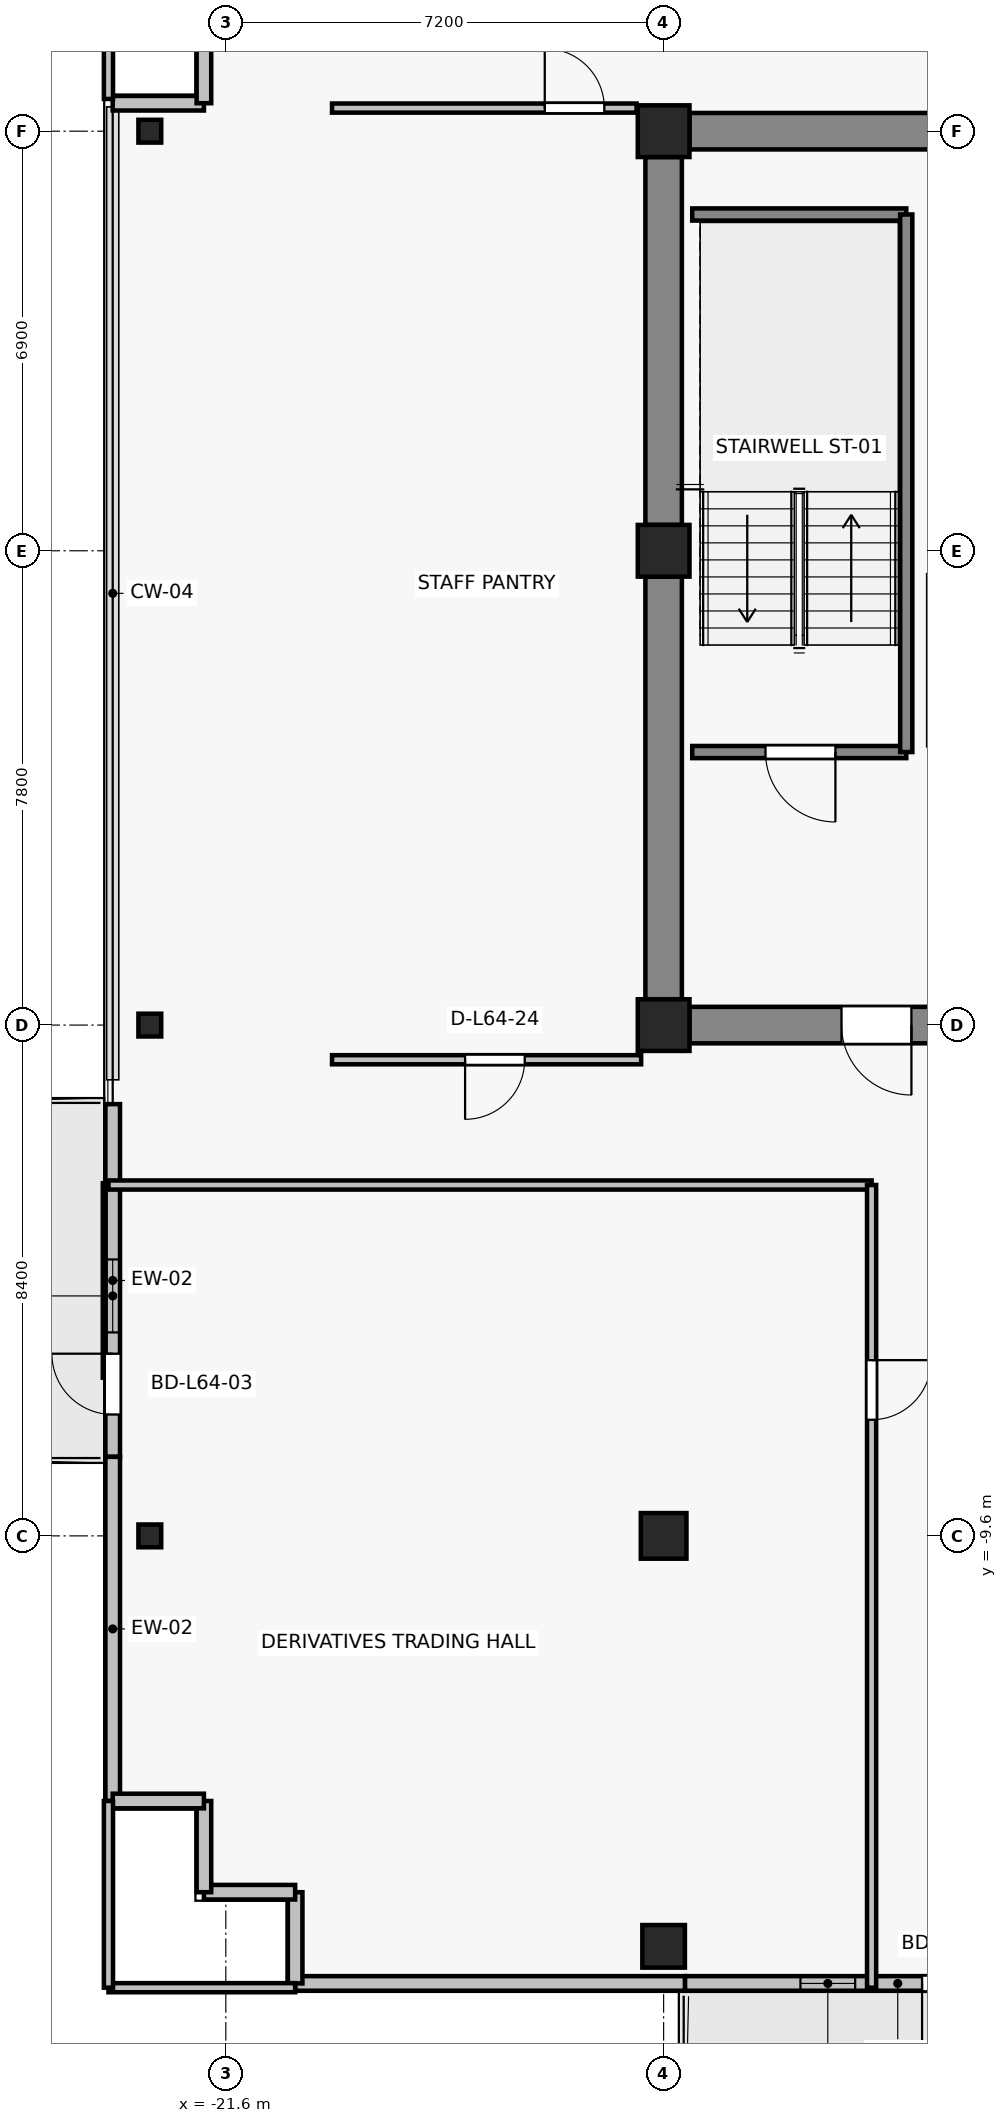
"""IFC4 building model, lengths in metres.
Left out: names, types, materials, properties, quantities, classifications, styles, units other than length and angle.
Written with IfcOpenShell. Run it as: python <this file> out.ifc"""

import sys

from ifc_helpers import new_model, si_unit, direction, frame, frame_2d, origin, origin_2d, place, context, subcontext, project, spatial, rectangle, i_section, extrude, source, transform, mapped, element, fill, save


model = new_model("IFC4")
c1 = context("Model", 3, precision=1e-05, world=origin(), true_north=direction((0.0, 1.0)))
c2 = subcontext(c1, "Body", "Model", "MODEL_VIEW")
j1 = project(units=[si_unit("LENGTHUNIT", "METRE"), si_unit("PLANEANGLEUNIT", "RADIAN")], contexts=[c1])
p1 = place(None, origin())
s1 = spatial("IfcSite", under=j1, at=p1, CompositionType="ELEMENT")
p2 = place(p1, origin())
s2 = spatial("IfcBuilding", under=s1, at=p2, CompositionType="ELEMENT")
p3 = place(p2, frame((0.0, 0.0, 228.7)))
s3 = spatial("IfcBuildingStorey", under=s2, at=p3, CompositionType="ELEMENT", Elevation=228.7)
for number, where, z_axis, x_axis in (
    (1, (-14.4, -1.2, 0.0), (0.0, 0.0, 1.0), (1.0, 0.0, 0.0)),
    (2, (-14.4, 6.6, 0.0), (0.0, 0.0, 1.0), (1.0, 0.0, 0.0)),
    (3, (-14.4, 13.5, 0.0), (0.0, 0.0, 1.0), (1.0, 0.0, 0.0)),
):
    element("IfcColumn", number, at=place(p3, frame(where, z_axis=z_axis, x_axis=x_axis)), inside=s3, PredefinedType="COLUMN", context=c2, shape_type="SweptSolid", body=[
        extrude(rectangle(XDim=0.85, YDim=0.85, at=origin_2d()), origin(), (0.0, 0.0, 1.0), 3.3),
    ])
p4 = place(p3, frame((-14.4, -9.6, 0.0), z_axis=(0.0, 0.0, 1.0), x_axis=(1.0, 0.0, 0.0)))
e4 = element("IfcColumn", 4, at=p4, inside=s3, PredefinedType="COLUMN", context=c2, shape_type="SweptSolid", body=[
    extrude(rectangle(XDim=0.75, YDim=0.75, at=origin_2d()), origin(), (0.0, 0.0, 1.0), 3.3),
])
p5 = place(p3, frame((-14.4, -16.35, 0.0), z_axis=(0.0, 0.0, 1.0), x_axis=(1.0, 0.0, 0.0)))
e5 = element("IfcColumn", 5, at=p5, inside=s3, PredefinedType="COLUMN", context=c2, shape_type="SweptSolid", body=[
    extrude(rectangle(XDim=0.7, YDim=0.7, at=origin_2d()), origin(), (0.0, 0.0, 1.0), 3.3),
])
for number, where, z_axis, x_axis in (
    (6, (-22.85, -9.6, 0.0), (0.0, 0.0, 1.0), (1.0, 0.0, 0.0)),
    (7, (-22.85, -1.2, 0.0), (0.0, 0.0, 1.0), (1.0, 0.0, 0.0)),
    (8, (-22.85, 13.5, 0.0), (0.0, 0.0, 1.0), (1.0, 0.0, 0.0)),
):
    element("IfcColumn", number, at=place(p3, frame(where, z_axis=z_axis, x_axis=x_axis)), inside=s3, PredefinedType="COLUMN", context=c2, shape_type="SweptSolid", body=[
        extrude(i_section(OverallWidth=0.375, OverallDepth=0.375, WebThickness=0.017, FlangeThickness=0.027, FilletRadius=0.015, at=origin_2d()), origin(), (0.0, 0.0, 1.0), 3.3),
    ])
p6 = place(p3, frame((-13.975, 13.5, 0.0), z_axis=(0.0, 0.0, 1.0), x_axis=(1.0, 0.0, 0.0)))
e9 = element("IfcWall", 9, at=p6, inside=s3, PredefinedType="SHEAR", context=c2, shape_type="SweptSolid", body=[
    extrude(rectangle(XDim=6.35, YDim=0.6, at=frame_2d((3.175, 0.0))), origin(), (0.0, 0.0, 1.0), 3.075),
])
p7 = place(p3, frame((-14.4, -0.775, 0.0), z_axis=(0.0, 0.0, 1.0), x_axis=(0.0, 1.0, 0.0)))
e10 = element("IfcWall", 10, at=p7, inside=s3, PredefinedType="SHEAR", context=c2, shape_type="SweptSolid", body=[
    extrude(rectangle(XDim=6.95, YDim=0.6, at=frame_2d((3.475, 0.0))), origin(), (0.0, 0.0, 1.0), 3.075),
])
p8 = place(p3, frame((-14.4, 7.025, 0.0), z_axis=(0.0, 0.0, 1.0), x_axis=(0.0, 1.0, 0.0)))
e11 = element("IfcWall", 11, at=p8, inside=s3, PredefinedType="SHEAR", context=c2, shape_type="SweptSolid", body=[
    extrude(rectangle(XDim=6.05, YDim=0.6, at=frame_2d((3.025, 0.0))), origin(), (0.0, 0.0, 1.0), 3.075),
])
p9 = place(p3, frame((-7.625, -1.2, 0.0), z_axis=(0.0, 0.0, 1.0), x_axis=(-1.0, 0.0, 0.0)))
e12 = element("IfcWall", 12, at=p9, inside=s3, PredefinedType="SHEAR", context=c2, shape_type="SweptSolid", body=[
    extrude(rectangle(XDim=6.35, YDim=0.6, at=frame_2d((3.175, 0.0))), origin(), (0.0, 0.0, 1.0), 3.075),
])
p10 = place(p9, frame((2.7, 0.0, 0.0)))
e13 = element("IfcOpeningElement", 13, at=p10, cuts=e12, PredefinedType="OPENING", context=c2, shape_type="SweptSolid", body=[
    extrude(rectangle(XDim=1.15, YDim=2.15, at=frame_2d((0.575, 1.075))), frame((0.0, 0.31, 0.0), z_axis=(0.0, -1.0, 0.0), x_axis=(1.0, 0.0, 0.0)), (0.0, 0.0, 1.0), 0.62),
])
p11 = place(p3, frame((-7.05, -16.96, 0.0), z_axis=(0.0, 0.0, 1.0), x_axis=(-1.0, 0.0, 0.0)))
e14 = element("IfcWall", 14, at=p11, inside=s3, PredefinedType="SOLIDWALL", context=c2, shape_type="SweptSolid", body=[
    extrude(rectangle(XDim=7.0, YDim=0.24, at=frame_2d((3.5, 0.0))), origin(), (0.0, 0.0, 1.0), 2.665),
])
p12 = place(p11, frame((2.1, 0.0, 0.0)))
e15 = element("IfcOpeningElement", 15, at=p12, cuts=e14, PredefinedType="OPENING", context=c2, shape_type="SweptSolid", body=[
    extrude(rectangle(XDim=1.0, YDim=2.2, at=frame_2d((0.5, 1.1))), frame((0.0, 0.13, 0.0), z_axis=(0.0, -1.0, 0.0), x_axis=(1.0, 0.0, 0.0)), (0.0, 0.0, 1.0), 0.26),
])
p13 = place(p11, frame((4.2, 0.0, 0.85)))
e16 = element("IfcOpeningElement", 16, at=p13, cuts=e14, PredefinedType="OPENING", context=c2, shape_type="SweptSolid", body=[
    extrude(rectangle(XDim=0.9, YDim=1.35, at=frame_2d((0.45, 0.675))), frame((0.0, 0.13, 0.0), z_axis=(0.0, -1.0, 0.0), x_axis=(1.0, 0.0, 0.0)), (0.0, 0.0, 1.0), 0.26),
])
p14 = place(p3, frame((-23.46, -8.3, 0.0), z_axis=(0.0, 0.0, 1.0), x_axis=(0.0, 1.0, 0.0)))
e17 = element("IfcWall", 17, at=p14, inside=s3, PredefinedType="SOLIDWALL", context=c2, shape_type="SweptSolid", body=[
    extrude(rectangle(XDim=5.8, YDim=0.24, at=frame_2d((2.9, 0.0))), origin(), (0.0, 0.0, 1.0), 3.075),
])
p15 = place(p14, frame((0.696, 0.0, 0.0)))
e18 = element("IfcOpeningElement", 18, at=p15, cuts=e17, PredefinedType="OPENING", context=c2, shape_type="SweptSolid", body=[
    extrude(rectangle(XDim=1.0, YDim=2.2, at=frame_2d((0.5, 1.1))), frame((0.0, 0.13, 0.0), z_axis=(0.0, -1.0, 0.0), x_axis=(1.0, 0.0, 0.0)), (0.0, 0.0, 1.0), 0.26),
])
p16 = place(p14, frame((2.046, 0.0, 0.85)))
e19 = element("IfcOpeningElement", 19, at=p16, cuts=e17, PredefinedType="OPENING", context=c2, shape_type="SweptSolid", body=[
    extrude(rectangle(XDim=1.2, YDim=1.5, at=frame_2d((0.6, 0.75))), frame((0.0, 0.13, 0.0), z_axis=(0.0, -1.0, 0.0), x_axis=(1.0, 0.0, 0.0)), (0.0, 0.0, 1.0), 0.26),
])
p17 = place(p3, frame((-23.46, -8.3, 0.0), z_axis=(0.0, 0.0, 1.0), x_axis=(0.0, -1.0, 0.0)))
e20 = element("IfcWall", 20, at=p17, inside=s3, PredefinedType="SOLIDWALL", context=c2, shape_type="SweptSolid", body=[
    extrude(rectangle(XDim=5.66, YDim=0.24, at=frame_2d((2.83, 0.0))), origin(), (0.0, 0.0, 1.0), 3.075),
])
for number, where, z_axis, x_axis in (
    (21, (-21.96, 13.96, 0.0), (0.0, 0.0, 1.0), (-1.0, 0.0, 0.0)),
    (22, (-21.96, 15.46, 0.0), (0.0, 0.0, 1.0), (0.0, -1.0, 0.0)),
):
    element("IfcWall", number, at=place(p3, frame(where, z_axis=z_axis, x_axis=x_axis)), inside=s3, PredefinedType="SOLIDWALL", context=c2, shape_type="SweptSolid", body=[
        extrude(rectangle(XDim=1.5, YDim=0.24, at=frame_2d((0.75, 0.0))), origin(), (0.0, 0.0, 1.0), 3.075),
    ])
p18 = place(p3, frame((-20.46, -16.96, 0.0), z_axis=(0.0, 0.0, 1.0), x_axis=(1.0, 0.0, 0.0)))
e23 = element("IfcWall", 23, at=p18, inside=s3, PredefinedType="SOLIDWALL", context=c2, shape_type="SweptSolid", body=[
    extrude(rectangle(XDim=6.41, YDim=0.24, at=frame_2d((3.205, 0.0))), origin(), (0.0, 0.0, 1.0), 3.075),
])
for number, where, z_axis, x_axis in (
    (24, (-20.46, -15.46, 0.0), (0.0, 0.0, 1.0), (0.0, -1.0, 0.0)),
    (25, (-21.96, -15.46, 0.0), (0.0, 0.0, 1.0), (1.0, 0.0, 0.0)),
    (26, (-21.96, -13.96, 0.0), (0.0, 0.0, 1.0), (0.0, -1.0, 0.0)),
    (27, (-23.46, -13.96, 0.0), (0.0, 0.0, 1.0), (1.0, 0.0, 0.0)),
):
    element("IfcWall", number, at=place(p3, frame(where, z_axis=z_axis, x_axis=x_axis)), inside=s3, PredefinedType="SOLIDWALL", context=c2, shape_type="SweptSolid", body=[
        extrude(rectangle(XDim=1.5, YDim=0.24, at=frame_2d((0.75, 0.0))), origin(), (0.0, 0.0, 1.0), 3.075),
    ])
p19 = place(p3, frame((-10.41, 3.29, 0.0), z_axis=(0.0, 0.0, 1.0), x_axis=(-1.0, 0.0, 0.0)))
e28 = element("IfcWall", 28, at=p19, inside=s3, PredefinedType="SOLIDWALL", context=c2, shape_type="SweptSolid", body=[
    extrude(rectangle(XDim=3.52, YDim=0.2, at=frame_2d((1.76, 0.0))), origin(), (0.0, 0.0, 1.0), 3.075),
])
p20 = place(p19, frame((1.165, 0.0, 0.0)))
e29 = element("IfcOpeningElement", 29, at=p20, cuts=e28, PredefinedType="OPENING", context=c2, shape_type="SweptSolid", body=[
    extrude(rectangle(XDim=1.15, YDim=2.15, at=frame_2d((0.575, 1.075))), frame((0.0, 0.11, 0.0), z_axis=(0.0, -1.0, 0.0), x_axis=(1.0, 0.0, 0.0)), (0.0, 0.0, 1.0), 0.22),
])
p21 = place(p3, frame((-13.93, 12.13, 0.0), z_axis=(0.0, 0.0, 1.0), x_axis=(1.0, 0.0, 0.0)))
e30 = element("IfcWall", 30, at=p21, inside=s3, PredefinedType="SOLIDWALL", context=c2, shape_type="SweptSolid", body=[
    extrude(rectangle(XDim=3.52, YDim=0.2, at=frame_2d((1.76, 0.0))), origin(), (0.0, 0.0, 1.0), 3.075),
])
p22 = place(p3, frame((-10.41, 12.13, 0.0), z_axis=(0.0, 0.0, 1.0), x_axis=(0.0, -1.0, 0.0)))
e31 = element("IfcWall", 31, at=p22, inside=s3, PredefinedType="SOLIDWALL", context=c2, shape_type="SweptSolid", body=[
    extrude(rectangle(XDim=8.84, YDim=0.2, at=frame_2d((4.42, 0.0))), origin(), (0.0, 0.0, 1.0), 3.075),
])
p23 = place(p3, frame((-20.46, -17.03, 0.0), z_axis=(0.0, 0.0, 1.0), x_axis=(-1.0, 0.0, 0.0)))
e32 = element("IfcWall", 32, at=p23, inside=s3, PredefinedType="PARTITIONING", context=c2, shape_type="SweptSolid", body=[
    extrude(rectangle(XDim=3.07, YDim=0.15, at=frame_2d((1.535, 0.0))), origin(), (0.0, 0.0, 1.0), 2.665),
])
p24 = place(p3, frame((-23.53, -3.83, 0.0), z_axis=(0.0, 0.0, 1.0), x_axis=(1.0, 0.0, 0.0)))
e33 = element("IfcWall", 33, at=p24, inside=s3, PredefinedType="PARTITIONING", context=c2, shape_type="SweptSolid", body=[
    extrude(rectangle(XDim=12.55, YDim=0.15, at=frame_2d((6.275, 0.0))), origin(), (0.0, 0.0, 1.0), 2.615),
])
p25 = place(p3, frame((-23.53, -17.03, 0.0), z_axis=(0.0, 0.0, 1.0), x_axis=(0.0, 1.0, 0.0)))
e34 = element("IfcWall", 34, at=p25, inside=s3, PredefinedType="PARTITIONING", context=c2, shape_type="SweptSolid", body=[
    extrude(rectangle(XDim=3.07, YDim=0.15, at=frame_2d((1.535, 0.0))), origin(), (0.0, 0.0, 1.0), 3.075),
])
p26 = place(p3, frame((-10.98, -3.83, 0.0), z_axis=(0.0, 0.0, 1.0), x_axis=(0.0, -1.0, 0.0)))
e35 = element("IfcWall", 35, at=p26, inside=s3, PredefinedType="PARTITIONING", context=c2, shape_type="SweptSolid", body=[
    extrude(rectangle(XDim=13.2, YDim=0.15, at=frame_2d((6.6, 0.0))), origin(), (0.0, 0.0, 1.0), 2.615),
])
p27 = place(p26, frame((2.88, 0.0, 0.0)))
e36 = element("IfcOpeningElement", 36, at=p27, cuts=e35, PredefinedType="OPENING", context=c2, shape_type="SweptSolid", body=[
    extrude(rectangle(XDim=0.98, YDim=2.15, at=frame_2d((0.49, 1.075))), frame((0.0, 0.085, 0.0), z_axis=(0.0, -1.0, 0.0), x_axis=(1.0, 0.0, 0.0)), (0.0, 0.0, 1.0), 0.17),
])
p28 = place(p3, frame((-14.77, -1.77, 0.0), z_axis=(0.0, 0.0, 1.0), x_axis=(-1.0, 0.0, 0.0)))
e37 = element("IfcWall", 37, at=p28, inside=s3, PredefinedType="PARTITIONING", context=c2, shape_type="SweptSolid", body=[
    extrude(rectangle(XDim=5.083, YDim=0.15, at=frame_2d((2.542, 0.0))), origin(), (0.0, 0.0, 1.0), 2.765),
])
p29 = place(p28, frame((1.915, 0.0, 0.0)))
e38 = element("IfcOpeningElement", 38, at=p29, cuts=e37, PredefinedType="OPENING", context=c2, shape_type="SweptSolid", body=[
    extrude(rectangle(XDim=0.98, YDim=2.15, at=frame_2d((0.49, 1.075))), frame((0.0, 0.085, 0.0), z_axis=(0.0, -1.0, 0.0), x_axis=(1.0, 0.0, 0.0)), (0.0, 0.0, 1.0), 0.17),
])
p30 = place(p3, frame((-19.853, 13.88, 0.0), z_axis=(0.0, 0.0, 1.0), x_axis=(1.0, 0.0, 0.0)))
e39 = element("IfcWall", 39, at=p30, inside=s3, PredefinedType="PARTITIONING", context=c2, shape_type="SweptSolid", body=[
    extrude(rectangle(XDim=5.008, YDim=0.15, at=frame_2d((2.504, 0.0))), origin(), (0.0, 0.0, 1.0), 3.075),
])
p31 = place(p30, frame((3.498, 0.0, 0.0)))
e40 = element("IfcOpeningElement", 40, at=p31, cuts=e39, PredefinedType="OPENING", context=c2, shape_type="SweptSolid", body=[
    extrude(rectangle(XDim=0.98, YDim=2.15, at=frame_2d((0.49, 1.075))), frame((0.0, 0.085, 0.0), z_axis=(0.0, -1.0, 0.0), x_axis=(1.0, 0.0, 0.0)), (0.0, 0.0, 1.0), 0.17),
])
p32 = place(p3, frame((-23.53, 14.03, 0.0), z_axis=(0.0, 0.0, 1.0), x_axis=(0.0, 1.0, 0.0)))
e41 = element("IfcWall", 41, at=p32, inside=s3, PredefinedType="PARTITIONING", context=c2, shape_type="SweptSolid", body=[
    extrude(rectangle(XDim=3.0, YDim=0.15, at=frame_2d((1.5, 0.0))), origin(), (0.0, 0.0, 1.0), 3.075),
])
m1 = source(origin(), c2, "Body", "SweptSolid", [
    extrude(rectangle(XDim=1.0, YDim=2.2, at=frame_2d((0.5, 1.1))), frame((0.0, 0.025, 0.0), z_axis=(0.0, -1.0, 0.0), x_axis=(1.0, 0.0, 0.0)), (0.0, 0.0, 1.0), 0.05),
])
p33 = place(p12, origin())
e42 = element("IfcDoor", 42, at=p33, inside=s3, OperationType="SINGLE_SWING_RIGHT", PredefinedType="DOOR", context=c2, shape_type="MappedRepresentation", body=[
    mapped(m1, transform((0.0, 0.0, 0.0), x_axis=(1.0, 0.0, 0.0), y_axis=(0.0, 1.0, 0.0), z_axis=(0.0, 0.0, 1.0), scale=1.0)),
])
fill(e15, e42)
m2 = source(origin(), c2, "Body", "SweptSolid", [
    extrude(rectangle(XDim=0.9, YDim=1.35, at=frame_2d((0.45, 0.675))), frame((0.0, 0.03, 0.0), z_axis=(0.0, -1.0, 0.0), x_axis=(1.0, 0.0, 0.0)), (0.0, 0.0, 1.0), 0.06),
])
p34 = place(p13, origin())
e43 = element("IfcWindow", 43, at=p34, inside=s3, PartitioningType="SINGLE_PANEL", PredefinedType="WINDOW", context=c2, shape_type="MappedRepresentation", body=[
    mapped(m2, transform((0.0, 0.0, 0.0), x_axis=(1.0, 0.0, 0.0), y_axis=(0.0, 1.0, 0.0), z_axis=(0.0, 0.0, 1.0), scale=1.0)),
])
fill(e16, e43)
p35 = place(p15, origin())
e44 = element("IfcDoor", 44, at=p35, inside=s3, OperationType="SINGLE_SWING_RIGHT", PredefinedType="DOOR", context=c2, shape_type="MappedRepresentation", body=[
    mapped(m1, transform((0.0, 0.0, 0.0), x_axis=(1.0, 0.0, 0.0), y_axis=(0.0, 1.0, 0.0), z_axis=(0.0, 0.0, 1.0), scale=1.0)),
])
fill(e18, e44)
m3 = source(origin(), c2, "Body", "SweptSolid", [
    extrude(rectangle(XDim=1.2, YDim=1.5, at=frame_2d((0.6, 0.75))), frame((0.0, 0.03, 0.0), z_axis=(0.0, -1.0, 0.0), x_axis=(1.0, 0.0, 0.0)), (0.0, 0.0, 1.0), 0.06),
])
p36 = place(p16, origin())
e45 = element("IfcWindow", 45, at=p36, inside=s3, PartitioningType="SINGLE_PANEL", PredefinedType="WINDOW", context=c2, shape_type="MappedRepresentation", body=[
    mapped(m3, transform((0.0, 0.0, 0.0), x_axis=(1.0, 0.0, 0.0), y_axis=(0.0, 1.0, 0.0), z_axis=(0.0, 0.0, 1.0), scale=1.0)),
])
fill(e19, e45)
m4 = source(origin(), c2, "Body", "SweptSolid", [
    extrude(rectangle(XDim=1.15, YDim=2.15, at=frame_2d((0.575, 1.075))), frame((0.0, 0.025, 0.0), z_axis=(0.0, -1.0, 0.0), x_axis=(1.0, 0.0, 0.0)), (0.0, 0.0, 1.0), 0.05),
])
p37 = place(p20, origin())
e46 = element("IfcDoor", 46, at=p37, inside=s3, OperationType="SINGLE_SWING_LEFT", PredefinedType="DOOR", context=c2, shape_type="MappedRepresentation", body=[
    mapped(m4, transform((0.0, 0.0, 0.0), x_axis=(1.0, 0.0, 0.0), y_axis=(0.0, 1.0, 0.0), z_axis=(0.0, 0.0, 1.0), scale=1.0)),
])
fill(e29, e46)
p38 = place(p10, origin())
e47 = element("IfcDoor", 47, at=p38, inside=s3, OperationType="SINGLE_SWING_LEFT", PredefinedType="DOOR", context=c2, shape_type="MappedRepresentation", body=[
    mapped(m4, transform((0.0, 0.0, 0.0), x_axis=(1.0, 0.0, 0.0), y_axis=(0.0, 1.0, 0.0), z_axis=(0.0, 0.0, 1.0), scale=1.0)),
])
fill(e13, e47)
m5 = source(origin(), c2, "Body", "SweptSolid", [
    extrude(rectangle(XDim=0.98, YDim=2.15, at=frame_2d((0.49, 1.075))), frame((0.0, 0.025, 0.0), z_axis=(0.0, -1.0, 0.0), x_axis=(1.0, 0.0, 0.0)), (0.0, 0.0, 1.0), 0.05),
])
p39 = place(p27, origin())
e48 = element("IfcDoor", 48, at=p39, inside=s3, OperationType="SINGLE_SWING_LEFT", PredefinedType="DOOR", context=c2, shape_type="MappedRepresentation", body=[
    mapped(m5, transform((0.0, 0.0, 0.0), x_axis=(1.0, 0.0, 0.0), y_axis=(0.0, 1.0, 0.0), z_axis=(0.0, 0.0, 1.0), scale=1.0)),
])
fill(e36, e48)
p40 = place(p29, origin())
e49 = element("IfcDoor", 49, at=p40, inside=s3, OperationType="SINGLE_SWING_RIGHT", PredefinedType="DOOR", context=c2, shape_type="MappedRepresentation", body=[
    mapped(m5, transform((0.0, 0.0, 0.0), x_axis=(1.0, 0.0, 0.0), y_axis=(0.0, 1.0, 0.0), z_axis=(0.0, 0.0, 1.0), scale=1.0)),
])
fill(e38, e49)
p41 = place(p31, origin())
e50 = element("IfcDoor", 50, at=p41, inside=s3, OperationType="SINGLE_SWING_LEFT", PredefinedType="DOOR", context=c2, shape_type="MappedRepresentation", body=[
    mapped(m5, transform((0.0, 0.0, 0.0), x_axis=(1.0, 0.0, 0.0), y_axis=(0.0, 1.0, 0.0), z_axis=(0.0, 0.0, 1.0), scale=1.0)),
])
fill(e40, e50)
save(model, sys.argv[1])
